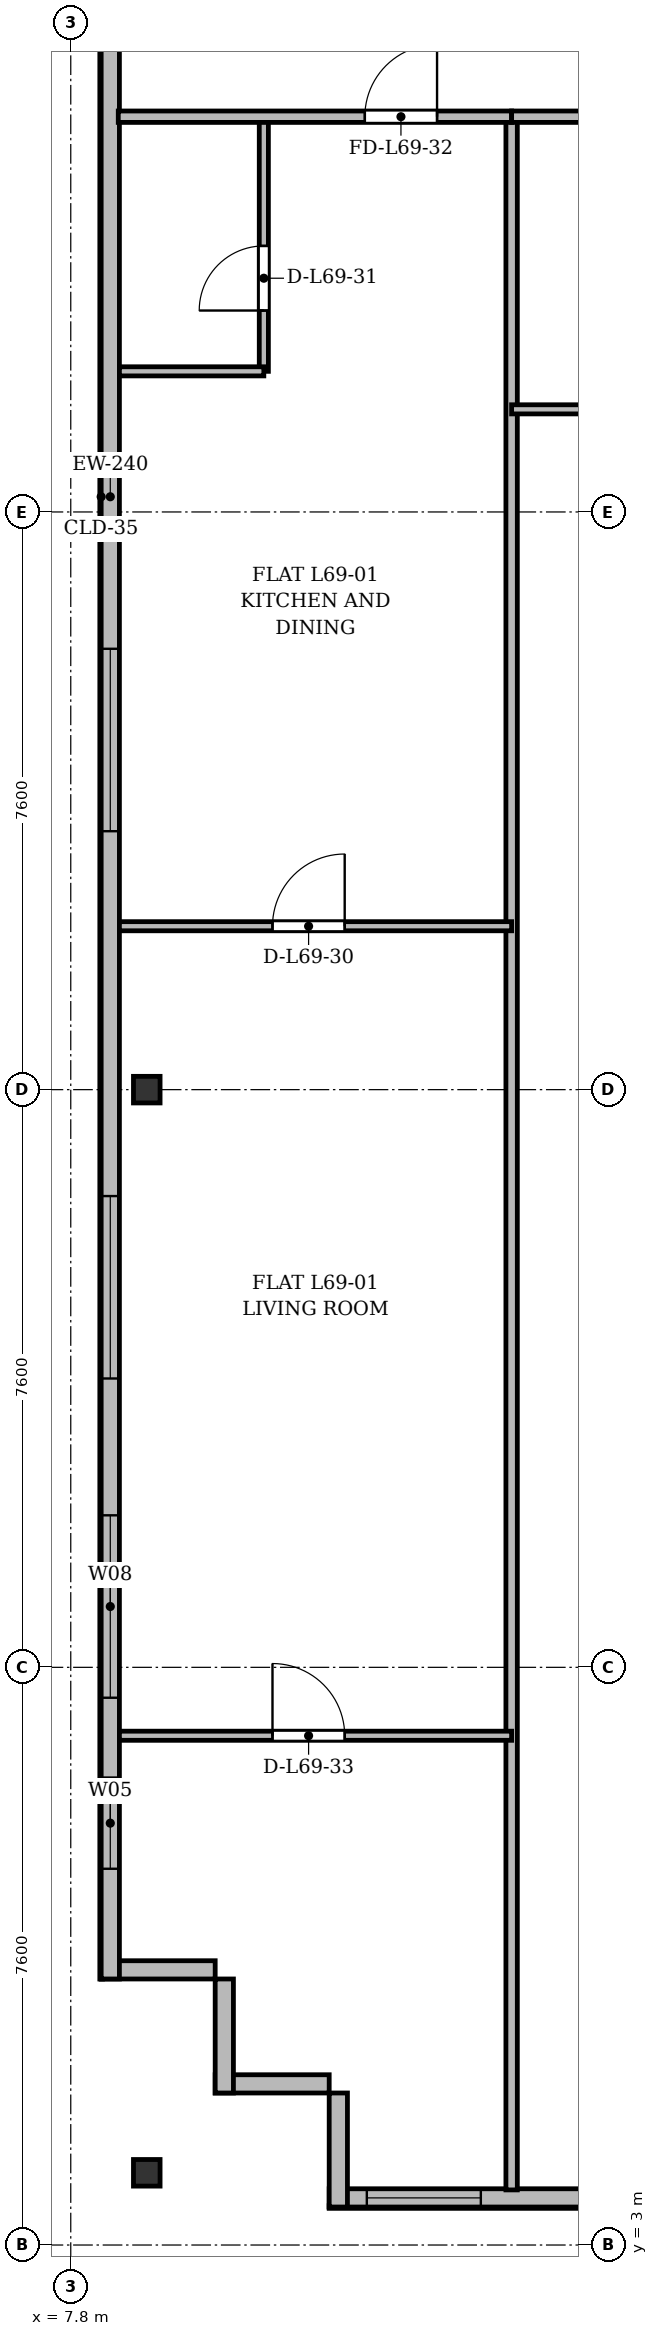
"""IFC4 building model, lengths in metres.
Left out: names, types, materials, properties, quantities, classifications, styles, units other than length and angle.
Written with IfcOpenShell. Run it as: python <this file> out.ifc"""

import sys

from ifc_helpers import new_model, si_unit, direction, frame, frame_2d, origin, origin_2d, place, context, subcontext, project, spatial, rectangle, i_section, extrude, source, transform, mapped, element, fill, save


model = new_model("IFC4")
c1 = context("Model", 3, precision=1e-05, world=origin(), true_north=direction((0.0, 1.0)))
c2 = subcontext(c1, "Body", "Model", "MODEL_VIEW")
j1 = project(units=[si_unit("LENGTHUNIT", "METRE"), si_unit("PLANEANGLEUNIT", "RADIAN")], contexts=[c1])
p1 = place(None, origin())
s1 = spatial("IfcSite", under=j1, at=p1, CompositionType="ELEMENT")
p2 = place(p1, origin())
s2 = spatial("IfcBuilding", under=s1, at=p2, CompositionType="ELEMENT")
p3 = place(p2, frame((0.0, 0.0, 266.7)))
s3 = spatial("IfcBuildingStorey", under=s2, at=p3, CompositionType="ELEMENT", Elevation=266.7)
m1 = source(origin(), c2, "Body", "SweptSolid", [
    extrude(i_section(OverallWidth=0.35, OverallDepth=0.35, WebThickness=0.018, FlangeThickness=0.028, at=origin_2d()), origin(), (0.0, 0.0, 1.0), 3.6),
])
for number, where, z_axis, x_axis in (
    (1, (8.8, 3.95, 0.0), (0.0, 0.0, 1.0), (1.0, 0.0, 0.0)),
    (2, (8.8, 18.2, 0.0), (0.0, 0.0, 1.0), (1.0, 0.0, 0.0)),
):
    element("IfcColumn", number, at=place(p3, frame(where, z_axis=z_axis, x_axis=x_axis)), inside=s3, PredefinedType="COLUMN", context=c2, shape_type="MappedRepresentation", body=[
        mapped(m1, transform((0.0, 0.0, 0.0), x_axis=(1.0, 0.0, 0.0), y_axis=(0.0, 1.0, 0.0), z_axis=(0.0, 0.0, 1.0), scale=1.0)),
    ])
for number, where, z_axis, x_axis in (
    (3, (11.2, 5.12, 0.0), (0.0, 0.0, 1.0), (-1.0, 0.0, 0.0)),
    (4, (9.82, 5.0, 0.0), (0.0, 0.0, 1.0), (0.0, 1.0, 0.0)),
):
    element("IfcWall", number, at=place(p3, frame(where, z_axis=z_axis, x_axis=x_axis)), inside=s3, PredefinedType="SOLIDWALL", context=c2, shape_type="SweptSolid", body=[
        extrude(rectangle(XDim=1.5, YDim=0.24, at=frame_2d((0.75, 0.0))), origin(), (0.0, 0.0, 1.0), 3.37),
    ])
p4 = place(p3, frame((9.7, 6.62, 0.0), z_axis=(0.0, 0.0, 1.0), x_axis=(-1.0, 0.0, 0.0)))
e5 = element("IfcWall", 5, at=p4, inside=s3, PredefinedType="SOLIDWALL", context=c2, shape_type="SweptSolid", body=[
    extrude(rectangle(XDim=1.5, YDim=0.24, at=frame_2d((0.75, 0.0))), origin(), (0.0, 0.0, 1.0), 2.87),
])
p5 = place(p3, frame((8.32, 6.5, 0.0), z_axis=(0.0, 0.0, 1.0), x_axis=(0.0, 1.0, 0.0)))
e6 = element("IfcWall", 6, at=p5, inside=s3, PredefinedType="SOLIDWALL", context=c2, shape_type="SweptSolid", body=[
    extrude(rectangle(XDim=39.0, YDim=0.24, at=frame_2d((19.5, 0.0))), origin(), (0.0, 0.0, 1.0), 3.37),
])
p6 = place(p5, frame((1.45, 0.0, 0.92)))
e7 = element("IfcOpeningElement", 7, at=p6, cuts=e6, PredefinedType="OPENING", context=c2, shape_type="SweptSolid", body=[
    extrude(rectangle(XDim=1.2, YDim=1.65, at=frame_2d((0.6, 0.825))), frame((0.0, 0.13, 0.0), z_axis=(0.0, -1.0, 0.0), x_axis=(1.0, 0.0, 0.0)), (0.0, 0.0, 1.0), 0.26),
])
p7 = place(p5, frame((3.7, 0.0, 0.92)))
e8 = element("IfcOpeningElement", 8, at=p7, cuts=e6, PredefinedType="OPENING", context=c2, shape_type="SweptSolid", body=[
    extrude(rectangle(XDim=2.4, YDim=2.1, at=frame_2d((1.2, 1.05))), frame((0.0, 0.13, 0.0), z_axis=(0.0, -1.0, 0.0), x_axis=(1.0, 0.0, 0.0)), (0.0, 0.0, 1.0), 0.26),
])
p8 = place(p5, frame((7.9, 0.0, 0.92)))
e9 = element("IfcOpeningElement", 9, at=p8, cuts=e6, PredefinedType="OPENING", context=c2, shape_type="SweptSolid", body=[
    extrude(rectangle(XDim=2.4, YDim=2.1, at=frame_2d((1.2, 1.05))), frame((0.0, 0.13, 0.0), z_axis=(0.0, -1.0, 0.0), x_axis=(1.0, 0.0, 0.0)), (0.0, 0.0, 1.0), 0.26),
])
p9 = place(p5, frame((15.1, 0.0, 0.92)))
e10 = element("IfcOpeningElement", 10, at=p9, cuts=e6, PredefinedType="OPENING", context=c2, shape_type="SweptSolid", body=[
    extrude(rectangle(XDim=2.4, YDim=2.1, at=frame_2d((1.2, 1.05))), frame((0.0, 0.13, 0.0), z_axis=(0.0, -1.0, 0.0), x_axis=(1.0, 0.0, 0.0)), (0.0, 0.0, 1.0), 0.26),
])
p10 = place(p5, frame((33.3, 0.0, 0.92)))
e11 = element("IfcOpeningElement", 11, at=p10, cuts=e6, PredefinedType="OPENING", context=c2, shape_type="SweptSolid", body=[
    extrude(rectangle(XDim=1.2, YDim=1.65, at=frame_2d((0.6, 0.825))), frame((0.0, 0.13, 0.0), z_axis=(0.0, -1.0, 0.0), x_axis=(1.0, 0.0, 0.0)), (0.0, 0.0, 1.0), 0.26),
])
p11 = place(p5, frame((36.65, 0.0, 0.92)))
e12 = element("IfcOpeningElement", 12, at=p11, cuts=e6, PredefinedType="OPENING", context=c2, shape_type="SweptSolid", body=[
    extrude(rectangle(XDim=1.2, YDim=1.65, at=frame_2d((0.6, 0.825))), frame((0.0, 0.13, 0.0), z_axis=(0.0, -1.0, 0.0), x_axis=(1.0, 0.0, 0.0)), (0.0, 0.0, 1.0), 0.26),
])
p12 = place(p3, frame((63.2, 3.62, 0.0), z_axis=(0.0, 0.0, 1.0), x_axis=(-1.0, 0.0, 0.0)))
e13 = element("IfcWall", 13, at=p12, inside=s3, PredefinedType="SOLIDWALL", context=c2, shape_type="SweptSolid", body=[
    extrude(rectangle(XDim=52.0, YDim=0.24, at=frame_2d((26.0, 0.0))), origin(), (0.0, 0.0, 1.0), 3.37),
])
p13 = place(p12, frame((0.345, 0.0, 0.9)))
e14 = element("IfcOpeningElement", 14, at=p13, cuts=e13, PredefinedType="OPENING", context=c2, shape_type="SweptSolid", body=[
    extrude(rectangle(XDim=1.2, YDim=1.65, at=frame_2d((0.6, 0.825))), frame((0.0, 0.13, 0.0), z_axis=(0.0, -1.0, 0.0), x_axis=(1.0, 0.0, 0.0)), (0.0, 0.0, 1.0), 0.26),
])
p14 = place(p12, frame((2.15, 0.0, 0.9)))
e15 = element("IfcOpeningElement", 15, at=p14, cuts=e13, PredefinedType="OPENING", context=c2, shape_type="SweptSolid", body=[
    extrude(rectangle(XDim=1.8, YDim=1.8, at=frame_2d((0.9, 0.9))), frame((0.0, 0.13, 0.0), z_axis=(0.0, -1.0, 0.0), x_axis=(1.0, 0.0, 0.0)), (0.0, 0.0, 1.0), 0.26),
])
p15 = place(p12, frame((5.42, 0.0, 0.0)))
e16 = element("IfcOpeningElement", 16, at=p15, cuts=e13, PredefinedType="OPENING", context=c2, shape_type="SweptSolid", body=[
    extrude(rectangle(XDim=1.2, YDim=2.2, at=frame_2d((0.6, 1.1))), frame((0.0, 0.13, 0.0), z_axis=(0.0, -1.0, 0.0), x_axis=(1.0, 0.0, 0.0)), (0.0, 0.0, 1.0), 0.26),
])
p16 = place(p12, frame((8.75, 0.0, 0.9)))
e17 = element("IfcOpeningElement", 17, at=p16, cuts=e13, PredefinedType="OPENING", context=c2, shape_type="SweptSolid", body=[
    extrude(rectangle(XDim=1.5, YDim=1.75, at=frame_2d((0.75, 0.875))), frame((0.0, 0.13, 0.0), z_axis=(0.0, -1.0, 0.0), x_axis=(1.0, 0.0, 0.0)), (0.0, 0.0, 1.0), 0.26),
])
p17 = place(p12, frame((14.8, 0.0, 0.9)))
e18 = element("IfcOpeningElement", 18, at=p17, cuts=e13, PredefinedType="OPENING", context=c2, shape_type="SweptSolid", body=[
    extrude(rectangle(XDim=2.0, YDim=1.95, at=frame_2d((1.0, 0.975))), frame((0.0, 0.13, 0.0), z_axis=(0.0, -1.0, 0.0), x_axis=(1.0, 0.0, 0.0)), (0.0, 0.0, 1.0), 0.26),
])
p18 = place(p12, frame((20.425, 0.0, 0.9)))
e19 = element("IfcOpeningElement", 19, at=p18, cuts=e13, PredefinedType="OPENING", context=c2, shape_type="SweptSolid", body=[
    extrude(rectangle(XDim=1.65, YDim=1.85, at=frame_2d((0.825, 0.925))), frame((0.0, 0.13, 0.0), z_axis=(0.0, -1.0, 0.0), x_axis=(1.0, 0.0, 0.0)), (0.0, 0.0, 1.0), 0.26),
])
p19 = place(p12, frame((24.05, 0.0, 0.9)))
e20 = element("IfcOpeningElement", 20, at=p19, cuts=e13, PredefinedType="OPENING", context=c2, shape_type="SweptSolid", body=[
    extrude(rectangle(XDim=1.8, YDim=1.8, at=frame_2d((0.9, 0.9))), frame((0.0, 0.13, 0.0), z_axis=(0.0, -1.0, 0.0), x_axis=(1.0, 0.0, 0.0)), (0.0, 0.0, 1.0), 0.26),
])
p20 = place(p12, frame((28.6, 0.0, 0.9)))
e21 = element("IfcOpeningElement", 21, at=p20, cuts=e13, PredefinedType="OPENING", context=c2, shape_type="SweptSolid", body=[
    extrude(rectangle(XDim=2.2, YDim=1.8, at=frame_2d((1.1, 0.9))), frame((0.0, 0.13, 0.0), z_axis=(0.0, -1.0, 0.0), x_axis=(1.0, 0.0, 0.0)), (0.0, 0.0, 1.0), 0.26),
])
p21 = place(p12, frame((34.078, 0.0, 0.0)))
e22 = element("IfcOpeningElement", 22, at=p21, cuts=e13, PredefinedType="OPENING", context=c2, shape_type="SweptSolid", body=[
    extrude(rectangle(XDim=1.2, YDim=2.2, at=frame_2d((0.6, 1.1))), frame((0.0, 0.13, 0.0), z_axis=(0.0, -1.0, 0.0), x_axis=(1.0, 0.0, 0.0)), (0.0, 0.0, 1.0), 0.26),
])
p22 = place(p12, frame((37.0, 0.0, 0.9)))
e23 = element("IfcOpeningElement", 23, at=p22, cuts=e13, PredefinedType="OPENING", context=c2, shape_type="SweptSolid", body=[
    extrude(rectangle(XDim=2.0, YDim=1.95, at=frame_2d((1.0, 0.975))), frame((0.0, 0.13, 0.0), z_axis=(0.0, -1.0, 0.0), x_axis=(1.0, 0.0, 0.0)), (0.0, 0.0, 1.0), 0.26),
])
p23 = place(p12, frame((41.075, 0.0, 0.9)))
e24 = element("IfcOpeningElement", 24, at=p23, cuts=e13, PredefinedType="OPENING", context=c2, shape_type="SweptSolid", body=[
    extrude(rectangle(XDim=1.65, YDim=1.85, at=frame_2d((0.825, 0.925))), frame((0.0, 0.13, 0.0), z_axis=(0.0, -1.0, 0.0), x_axis=(1.0, 0.0, 0.0)), (0.0, 0.0, 1.0), 0.26),
])
p24 = place(p12, frame((44.19, 0.0, 0.9)))
e25 = element("IfcOpeningElement", 25, at=p24, cuts=e13, PredefinedType="OPENING", context=c2, shape_type="SweptSolid", body=[
    extrude(rectangle(XDim=1.8, YDim=1.8, at=frame_2d((0.9, 0.9))), frame((0.0, 0.13, 0.0), z_axis=(0.0, -1.0, 0.0), x_axis=(1.0, 0.0, 0.0)), (0.0, 0.0, 1.0), 0.26),
])
p25 = place(p12, frame((50.005, 0.0, 0.9)))
e26 = element("IfcOpeningElement", 26, at=p25, cuts=e13, PredefinedType="OPENING", context=c2, shape_type="SweptSolid", body=[
    extrude(rectangle(XDim=1.5, YDim=1.75, at=frame_2d((0.75, 0.875))), frame((0.0, 0.13, 0.0), z_axis=(0.0, -1.0, 0.0), x_axis=(1.0, 0.0, 0.0)), (0.0, 0.0, 1.0), 0.26),
])
p26 = place(p3, frame((11.32, 3.5, 0.0), z_axis=(0.0, 0.0, 1.0), x_axis=(0.0, 1.0, 0.0)))
e27 = element("IfcWall", 27, at=p26, inside=s3, PredefinedType="SOLIDWALL", context=c2, shape_type="SweptSolid", body=[
    extrude(rectangle(XDim=1.5, YDim=0.24, at=frame_2d((0.75, 0.0))), origin(), (0.0, 0.0, 1.0), 2.92),
])
p27 = place(p3, frame((13.6, 3.725, 0.0), z_axis=(0.0, 0.0, 1.0), x_axis=(0.0, 1.0, 0.0)))
e28 = element("IfcWall", 28, at=p27, inside=s3, PredefinedType="PARTITIONING", context=c2, shape_type="SweptSolid", body=[
    extrude(rectangle(XDim=27.275, YDim=0.15, at=frame_2d((13.637, 0.0))), origin(), (0.0, 0.0, 1.0), 2.92),
])
p28 = place(p3, frame((8.44, 20.35, 0.0), z_axis=(0.0, 0.0, 1.0), x_axis=(1.0, 0.0, 0.0)))
e29 = element("IfcWall", 29, at=p28, inside=s3, PredefinedType="PARTITIONING", context=c2, shape_type="SweptSolid", body=[
    extrude(rectangle(XDim=5.16, YDim=0.12, at=frame_2d((2.58, 0.0))), origin(), (0.0, 0.0, 1.0), 2.87),
])
p29 = place(p28, frame((2.014, 0.0, 0.0)))
e30 = element("IfcOpeningElement", 30, at=p29, cuts=e29, PredefinedType="OPENING", context=c2, shape_type="SweptSolid", body=[
    extrude(rectangle(XDim=0.95, YDim=2.15, at=frame_2d((0.475, 1.075))), frame((0.0, 0.07, 0.0), z_axis=(0.0, -1.0, 0.0), x_axis=(1.0, 0.0, 0.0)), (0.0, 0.0, 1.0), 0.14),
])
p30 = place(p3, frame((10.34, 27.65, 0.0), z_axis=(0.0, 0.0, 1.0), x_axis=(0.0, 1.0, 0.0)))
e31 = element("IfcWall", 31, at=p30, inside=s3, PredefinedType="PARTITIONING", context=c2, shape_type="SweptSolid", body=[
    extrude(rectangle(XDim=3.35, YDim=0.12, at=frame_2d((1.675, 0.0))), origin(), (0.0, 0.0, 1.0), 3.37),
])
p31 = place(p30, frame((0.8, 0.0, 0.0)))
e32 = element("IfcOpeningElement", 32, at=p31, cuts=e31, PredefinedType="OPENING", context=c2, shape_type="SweptSolid", body=[
    extrude(rectangle(XDim=0.85, YDim=2.1, at=frame_2d((0.425, 1.05))), frame((0.0, 0.07, 0.0), z_axis=(0.0, -1.0, 0.0), x_axis=(1.0, 0.0, 0.0)), (0.0, 0.0, 1.0), 0.14),
])
p32 = place(p3, frame((8.44, 27.65, 0.0), z_axis=(0.0, 0.0, 1.0), x_axis=(1.0, 0.0, 0.0)))
e33 = element("IfcWall", 33, at=p32, inside=s3, PredefinedType="PARTITIONING", context=c2, shape_type="SweptSolid", body=[
    extrude(rectangle(XDim=1.9, YDim=0.12, at=frame_2d((0.95, 0.0))), origin(), (0.0, 0.0, 1.0), 2.87),
])
p33 = place(p3, frame((8.425, 31.0, 0.0), z_axis=(0.0, 0.0, 1.0), x_axis=(1.0, 0.0, 0.0)))
e34 = element("IfcWall", 34, at=p33, inside=s3, PredefinedType="PARTITIONING", context=c2, shape_type="SweptSolid", body=[
    extrude(rectangle(XDim=5.175, YDim=0.15, at=frame_2d((2.587, 0.0))), origin(), (0.0, 0.0, 1.0), 2.87),
])
p34 = place(p33, frame((3.244, 0.0, 0.0)))
e35 = element("IfcOpeningElement", 35, at=p34, cuts=e34, PredefinedType="OPENING", context=c2, shape_type="SweptSolid", body=[
    extrude(rectangle(XDim=0.95, YDim=2.15, at=frame_2d((0.475, 1.075))), frame((0.0, 0.085, 0.0), z_axis=(0.0, -1.0, 0.0), x_axis=(1.0, 0.0, 0.0)), (0.0, 0.0, 1.0), 0.17),
])
p35 = place(p3, frame((8.44, 9.7, 0.0), z_axis=(0.0, 0.0, 1.0), x_axis=(1.0, 0.0, 0.0)))
e36 = element("IfcWall", 36, at=p35, inside=s3, PredefinedType="PARTITIONING", context=c2, shape_type="SweptSolid", body=[
    extrude(rectangle(XDim=5.16, YDim=0.12, at=frame_2d((2.58, 0.0))), origin(), (0.0, 0.0, 1.0), 2.87),
])
p36 = place(p35, frame((2.014, 0.0, 0.0)))
e37 = element("IfcOpeningElement", 37, at=p36, cuts=e36, PredefinedType="OPENING", context=c2, shape_type="SweptSolid", body=[
    extrude(rectangle(XDim=0.95, YDim=2.15, at=frame_2d((0.475, 1.075))), frame((0.0, 0.07, 0.0), z_axis=(0.0, -1.0, 0.0), x_axis=(1.0, 0.0, 0.0)), (0.0, 0.0, 1.0), 0.14),
])
p37 = place(p3, frame((13.6, 31.0, 0.0), z_axis=(0.0, 0.0, 1.0), x_axis=(1.0, 0.0, 0.0)))
e38 = element("IfcWall", 38, at=p37, inside=s3, PredefinedType="PARTITIONING", context=c2, shape_type="SweptSolid", body=[
    extrude(rectangle(XDim=5.6, YDim=0.15, at=frame_2d((2.8, 0.0))), origin(), (0.0, 0.0, 1.0), 2.87),
])
p38 = place(p37, frame((2.232, 0.0, 0.0)))
e39 = element("IfcOpeningElement", 39, at=p38, cuts=e38, PredefinedType="OPENING", context=c2, shape_type="SweptSolid", body=[
    extrude(rectangle(XDim=0.95, YDim=2.15, at=frame_2d((0.475, 1.075))), frame((0.0, 0.085, 0.0), z_axis=(0.0, -1.0, 0.0), x_axis=(1.0, 0.0, 0.0)), (0.0, 0.0, 1.0), 0.17),
])
p39 = place(p3, frame((13.6, 27.15, 0.0), z_axis=(0.0, 0.0, 1.0), x_axis=(1.0, 0.0, 0.0)))
e40 = element("IfcWall", 40, at=p39, inside=s3, PredefinedType="PARTITIONING", context=c2, shape_type="SweptSolid", body=[
    extrude(rectangle(XDim=5.6, YDim=0.12, at=frame_2d((2.8, 0.0))), origin(), (0.0, 0.0, 1.0), 2.87),
])
p40 = place(p39, frame((2.232, 0.0, 0.0)))
e41 = element("IfcOpeningElement", 41, at=p40, cuts=e40, PredefinedType="OPENING", context=c2, shape_type="SweptSolid", body=[
    extrude(rectangle(XDim=0.95, YDim=2.15, at=frame_2d((0.475, 1.075))), frame((0.0, 0.07, 0.0), z_axis=(0.0, -1.0, 0.0), x_axis=(1.0, 0.0, 0.0)), (0.0, 0.0, 1.0), 0.14),
])
m2 = source(origin(), c2, "Body", "SweptSolid", [
    extrude(rectangle(XDim=1.2, YDim=1.65, at=frame_2d((0.6, 0.825))), frame((0.0, 0.03, 0.0), z_axis=(0.0, -1.0, 0.0), x_axis=(1.0, 0.0, 0.0)), (0.0, 0.0, 1.0), 0.06),
])
p41 = place(p6, origin())
e42 = element("IfcWindow", 42, at=p41, inside=s3, PartitioningType="SINGLE_PANEL", PredefinedType="WINDOW", context=c2, shape_type="MappedRepresentation", body=[
    mapped(m2, transform((0.0, 0.0, 0.0), x_axis=(1.0, 0.0, 0.0), y_axis=(0.0, 1.0, 0.0), z_axis=(0.0, 0.0, 1.0), scale=1.0)),
])
fill(e7, e42)
m3 = source(origin(), c2, "Body", "SweptSolid", [
    extrude(rectangle(XDim=2.4, YDim=2.1, at=frame_2d((1.2, 1.05))), frame((0.0, 0.03, 0.0), z_axis=(0.0, -1.0, 0.0), x_axis=(1.0, 0.0, 0.0)), (0.0, 0.0, 1.0), 0.06),
])
p42 = place(p7, origin())
e43 = element("IfcWindow", 43, at=p42, inside=s3, PartitioningType="SINGLE_PANEL", PredefinedType="WINDOW", context=c2, shape_type="MappedRepresentation", body=[
    mapped(m3, transform((0.0, 0.0, 0.0), x_axis=(1.0, 0.0, 0.0), y_axis=(0.0, 1.0, 0.0), z_axis=(0.0, 0.0, 1.0), scale=1.0)),
])
fill(e8, e43)
p43 = place(p8, origin())
e44 = element("IfcWindow", 44, at=p43, inside=s3, PartitioningType="SINGLE_PANEL", PredefinedType="WINDOW", context=c2, shape_type="MappedRepresentation", body=[
    mapped(m3, transform((0.0, 0.0, 0.0), x_axis=(1.0, 0.0, 0.0), y_axis=(0.0, 1.0, 0.0), z_axis=(0.0, 0.0, 1.0), scale=1.0)),
])
fill(e9, e44)
p44 = place(p9, origin())
e45 = element("IfcWindow", 45, at=p44, inside=s3, PartitioningType="SINGLE_PANEL", PredefinedType="WINDOW", context=c2, shape_type="MappedRepresentation", body=[
    mapped(m3, transform((0.0, 0.0, 0.0), x_axis=(1.0, 0.0, 0.0), y_axis=(0.0, 1.0, 0.0), z_axis=(0.0, 0.0, 1.0), scale=1.0)),
])
fill(e10, e45)
m4 = source(origin(), c2, "Body", "SweptSolid", [
    extrude(rectangle(XDim=1.5, YDim=1.75, at=frame_2d((0.75, 0.875))), frame((0.0, 0.03, 0.0), z_axis=(0.0, -1.0, 0.0), x_axis=(1.0, 0.0, 0.0)), (0.0, 0.0, 1.0), 0.06),
])
p45 = place(p25, origin())
e46 = element("IfcWindow", 46, at=p45, inside=s3, PartitioningType="SINGLE_PANEL", PredefinedType="WINDOW", context=c2, shape_type="MappedRepresentation", body=[
    mapped(m4, transform((0.0, 0.0, 0.0), x_axis=(1.0, 0.0, 0.0), y_axis=(0.0, 1.0, 0.0), z_axis=(0.0, 0.0, 1.0), scale=1.0)),
])
fill(e26, e46)
m5 = source(origin(), c2, "Body", "SweptSolid", [
    extrude(rectangle(XDim=0.95, YDim=2.15, at=frame_2d((0.475, 1.075))), frame((0.0, 0.025, 0.0), z_axis=(0.0, -1.0, 0.0), x_axis=(1.0, 0.0, 0.0)), (0.0, 0.0, 1.0), 0.05),
])
p46 = place(p29, origin())
e47 = element("IfcDoor", 47, at=p46, inside=s3, OperationType="SINGLE_SWING_RIGHT", PredefinedType="DOOR", context=c2, shape_type="MappedRepresentation", body=[
    mapped(m5, transform((0.0, 0.0, 0.0), x_axis=(1.0, 0.0, 0.0), y_axis=(0.0, 1.0, 0.0), z_axis=(0.0, 0.0, 1.0), scale=1.0)),
])
fill(e30, e47)
m6 = source(origin(), c2, "Body", "SweptSolid", [
    extrude(rectangle(XDim=0.85, YDim=2.1, at=frame_2d((0.425, 1.05))), frame((0.0, 0.025, 0.0), z_axis=(0.0, -1.0, 0.0), x_axis=(1.0, 0.0, 0.0)), (0.0, 0.0, 1.0), 0.05),
])
p47 = place(p31, origin())
e48 = element("IfcDoor", 48, at=p47, inside=s3, OperationType="SINGLE_SWING_LEFT", PredefinedType="DOOR", context=c2, shape_type="MappedRepresentation", body=[
    mapped(m6, transform((0.0, 0.0, 0.0), x_axis=(1.0, 0.0, 0.0), y_axis=(0.0, 1.0, 0.0), z_axis=(0.0, 0.0, 1.0), scale=1.0)),
])
fill(e32, e48)
p48 = place(p34, origin())
e49 = element("IfcDoor", 49, at=p48, inside=s3, OperationType="SINGLE_SWING_RIGHT", PredefinedType="DOOR", context=c2, shape_type="MappedRepresentation", body=[
    mapped(m5, transform((0.0, 0.0, 0.0), x_axis=(1.0, 0.0, 0.0), y_axis=(0.0, 1.0, 0.0), z_axis=(0.0, 0.0, 1.0), scale=1.0)),
])
fill(e35, e49)
p49 = place(p36, origin())
e50 = element("IfcDoor", 50, at=p49, inside=s3, OperationType="SINGLE_SWING_LEFT", PredefinedType="DOOR", context=c2, shape_type="MappedRepresentation", body=[
    mapped(m5, transform((0.0, 0.0, 0.0), x_axis=(1.0, 0.0, 0.0), y_axis=(0.0, 1.0, 0.0), z_axis=(0.0, 0.0, 1.0), scale=1.0)),
])
fill(e37, e50)
save(model, sys.argv[1])
